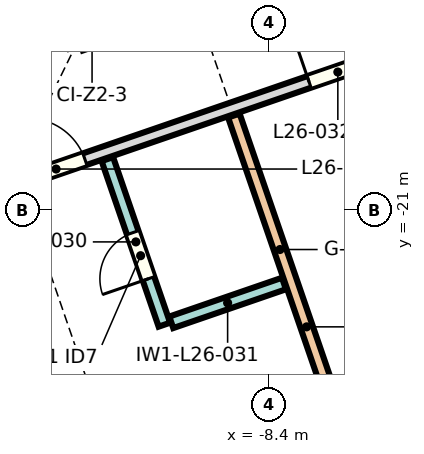
"""IFC4 building model, lengths in metres.
Left out: names, types, materials, properties, quantities, classifications, styles, units other than length and angle.
Written with IfcOpenShell. Run it as: python <this file> out.ifc"""

import sys

from ifc_helpers import new_model, si_unit, direction, frame, frame_2d, origin, place, context, subcontext, project, spatial, rectangle, extrude, element, fill, save


model = new_model("IFC4")
c1 = context("Model", 3, precision=1e-05, world=origin(), true_north=direction((0.0, 1.0)))
c2 = subcontext(c1, "Body", "Model", "MODEL_VIEW")
j1 = project(units=[si_unit("LENGTHUNIT", "METRE"), si_unit("PLANEANGLEUNIT", "RADIAN")], contexts=[c1])
p1 = place(None, origin())
s1 = spatial("IfcSite", under=j1, at=p1, CompositionType="ELEMENT")
p2 = place(p1, origin())
s2 = spatial("IfcBuilding", under=s1, at=p2, CompositionType="ELEMENT")
p3 = place(p2, frame((0.0, 0.0, 126.9)))
s3 = spatial("IfcBuildingStorey", under=s2, at=p3, CompositionType="ELEMENT", Elevation=126.9)
p4 = place(p3, frame((-12.605, -20.522, 0.0), z_axis=(0.0, 0.0, 1.0), x_axis=(0.945519651594, 0.325565029526, 0.0)))
e1 = element("IfcWall", 1, at=p4, inside=s3, PredefinedType="PARTITIONING", context=c2, shape_type="SweptSolid", body=[
    extrude(rectangle(XDim=37.3, YDim=0.2, at=frame_2d((18.65, 0.0))), origin(), (0.0, 0.0, 1.0), 3.55),
])
p5 = place(p4, frame((5.15, 0.0, 0.0)))
e2 = element("IfcOpeningElement", 2, at=p5, cuts=e1, PredefinedType="OPENING", context=c2, shape_type="SweptSolid", body=[
    extrude(rectangle(XDim=1.0, YDim=2.1, at=frame_2d((0.5, 1.05))), frame((0.0, 0.11, 0.0), z_axis=(0.0, -1.0, 0.0), x_axis=(1.0, 0.0, 0.0)), (0.0, 0.0, 1.0), 0.22),
])
p6 = place(p4, frame((8.85, 0.0, 0.0)))
e3 = element("IfcOpeningElement", 3, at=p6, cuts=e1, PredefinedType="OPENING", context=c2, shape_type="SweptSolid", body=[
    extrude(rectangle(XDim=1.0, YDim=2.1, at=frame_2d((0.5, 1.05))), frame((0.0, 0.11, 0.0), z_axis=(0.0, -1.0, 0.0), x_axis=(1.0, 0.0, 0.0)), (0.0, 0.0, 1.0), 0.22),
])
p7 = place(p4, frame((12.55, 0.0, 0.0)))
e4 = element("IfcOpeningElement", 4, at=p7, cuts=e1, PredefinedType="OPENING", context=c2, shape_type="SweptSolid", body=[
    extrude(rectangle(XDim=1.0, YDim=2.1, at=frame_2d((0.5, 1.05))), frame((0.0, 0.11, 0.0), z_axis=(0.0, -1.0, 0.0), x_axis=(1.0, 0.0, 0.0)), (0.0, 0.0, 1.0), 0.22),
])
p8 = place(p4, frame((21.05, 0.0, 0.0)))
e5 = element("IfcOpeningElement", 5, at=p8, cuts=e1, PredefinedType="OPENING", context=c2, shape_type="SweptSolid", body=[
    extrude(rectangle(XDim=1.0, YDim=2.1, at=frame_2d((0.5, 1.05))), frame((0.0, 0.11, 0.0), z_axis=(0.0, -1.0, 0.0), x_axis=(1.0, 0.0, 0.0)), (0.0, 0.0, 1.0), 0.22),
])
p9 = place(p4, frame((28.325, 0.0, 0.0)))
e6 = element("IfcOpeningElement", 6, at=p9, cuts=e1, PredefinedType="OPENING", context=c2, shape_type="SweptSolid", body=[
    extrude(rectangle(XDim=0.95, YDim=2.1, at=frame_2d((0.475, 1.05))), frame((0.0, 0.11, 0.0), z_axis=(0.0, -1.0, 0.0), x_axis=(1.0, 0.0, 0.0)), (0.0, 0.0, 1.0), 0.22),
])
p10 = place(p4, frame((0.25, 0.0, 0.0)))
e7 = element("IfcOpeningElement", 7, at=p10, cuts=e1, PredefinedType="OPENING", context=c2, shape_type="SweptSolid", body=[
    extrude(rectangle(XDim=1.0, YDim=2.1, at=frame_2d((0.5, 1.05))), frame((0.0, 0.11, 0.0), z_axis=(0.0, -1.0, 0.0), x_axis=(1.0, 0.0, 0.0)), (0.0, 0.0, 1.0), 0.22),
])
p11 = place(p4, frame((34.25, 0.0, 0.0)))
e8 = element("IfcOpeningElement", 8, at=p11, cuts=e1, PredefinedType="OPENING", context=c2, shape_type="SweptSolid", body=[
    extrude(rectangle(XDim=1.1, YDim=2.1, at=frame_2d((0.55, 1.05))), frame((0.0, 0.11, 0.0), z_axis=(0.0, -1.0, 0.0), x_axis=(1.0, 0.0, 0.0)), (0.0, 0.0, 1.0), 0.22),
])
p12 = place(p3, frame((-10.116, -22.838, 0.0), z_axis=(0.0, 0.0, 1.0), x_axis=(-0.325596179186, 0.945508925447, 0.0)))
e9 = element("IfcWall", 9, at=p12, inside=s3, PredefinedType="PARTITIONING", context=c2, shape_type="SweptSolid", body=[
    extrude(rectangle(XDim=2.88, YDim=0.2, at=frame_2d((1.44, 0.0))), origin(), (0.0, 0.0, 1.0), 3.55),
])
p13 = place(p12, frame((0.8, 0.0, 0.0)))
e10 = element("IfcOpeningElement", 10, at=p13, cuts=e9, PredefinedType="OPENING", context=c2, shape_type="SweptSolid", body=[
    extrude(rectangle(XDim=0.8, YDim=2.1, at=frame_2d((0.4, 1.05))), frame((0.0, 0.11, 0.0), z_axis=(0.0, -1.0, 0.0), x_axis=(1.0, 0.0, 0.0)), (0.0, 0.0, 1.0), 0.22),
])
p14 = place(p3, frame((-8.149, -22.16, 0.0), z_axis=(0.0, 0.0, 1.0), x_axis=(-0.945510558394, -0.325591437181, 0.0)))
e11 = element("IfcWall", 11, at=p14, inside=s3, PredefinedType="PARTITIONING", context=c2, shape_type="SweptSolid", body=[
    extrude(rectangle(XDim=1.96, YDim=0.2, at=frame_2d((0.98, 0.0))), origin(), (0.0, 0.0, 1.0), 3.55),
])
p15 = place(p3, frame((-6.581, -26.348, 0.0), z_axis=(0.0, 0.0, 1.0), x_axis=(-0.325549451152, 0.945525015457, 0.0)))
e12 = element("IfcWall", 12, at=p15, inside=s3, PredefinedType="PARTITIONING", context=c2, shape_type="SweptSolid", body=[
    extrude(rectangle(XDim=7.35, YDim=0.2, at=frame_2d((3.675, 0.0))), origin(), (0.0, 0.0, 1.0), 2.65),
])
p16 = place(p5, origin())
e13 = element("IfcDoor", 13, at=p16, inside=s3, OperationType="NOTDEFINED", PredefinedType="DOOR", context=c2, shape_type="SweptSolid", body=[
    extrude(rectangle(XDim=1.0, YDim=2.1, at=frame_2d((0.5, 1.05))), frame((0.0, 0.025, 0.0), z_axis=(0.0, -1.0, 0.0), x_axis=(1.0, 0.0, 0.0)), (0.0, 0.0, 1.0), 0.05),
])
fill(e2, e13)
p17 = place(p10, origin())
e14 = element("IfcDoor", 14, at=p17, inside=s3, OperationType="NOTDEFINED", PredefinedType="DOOR", context=c2, shape_type="SweptSolid", body=[
    extrude(rectangle(XDim=1.0, YDim=2.1, at=frame_2d((0.5, 1.05))), frame((0.0, 0.025, 0.0), z_axis=(0.0, -1.0, 0.0), x_axis=(1.0, 0.0, 0.0)), (0.0, 0.0, 1.0), 0.05),
])
fill(e7, e14)
p18 = place(p13, origin())
e15 = element("IfcDoor", 15, at=p18, inside=s3, OperationType="NOTDEFINED", PredefinedType="DOOR", context=c2, shape_type="SweptSolid", body=[
    extrude(rectangle(XDim=0.8, YDim=2.1, at=frame_2d((0.4, 1.05))), frame((0.0, 0.025, 0.0), z_axis=(0.0, -1.0, 0.0), x_axis=(1.0, 0.0, 0.0)), (0.0, 0.0, 1.0), 0.05),
])
fill(e10, e15)
save(model, sys.argv[1])
